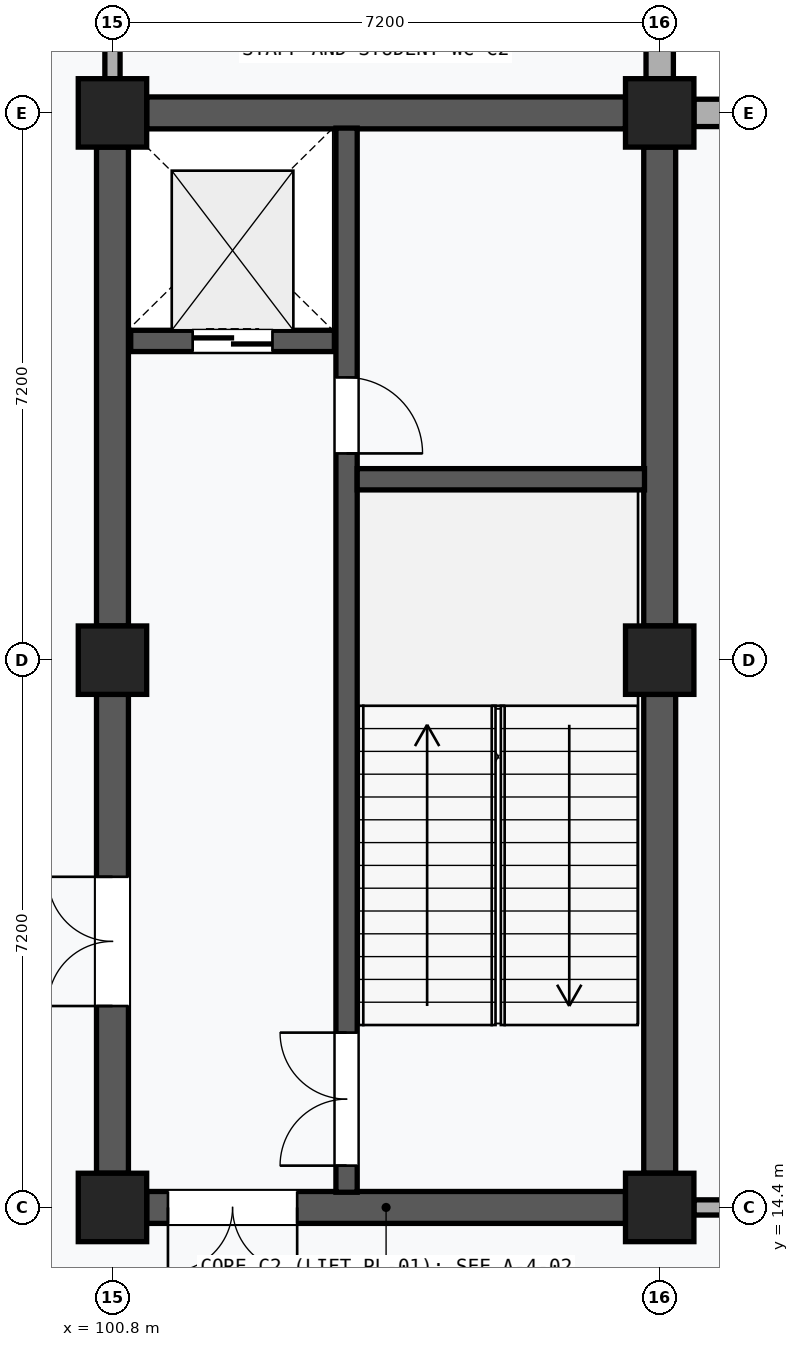
"""IFC4 building model, lengths in metres.
Left out: names, types, materials, properties, quantities, classifications, styles, units other than length and angle.
Written with IfcOpenShell. Run it as: python <this file> out.ifc"""

import sys

from ifc_helpers import new_model, si_unit, direction, frame, frame_2d, origin, origin_2d, place, context, subcontext, project, spatial, rectangle, extrude, element, fill, save


model = new_model("IFC4")
c1 = context("Model", 3, precision=1e-05, world=origin(), true_north=direction((0.0, 1.0)))
c2 = subcontext(c1, "Body", "Model", "MODEL_VIEW")
j1 = project(units=[si_unit("LENGTHUNIT", "METRE"), si_unit("PLANEANGLEUNIT", "RADIAN")], contexts=[c1])
p1 = place(None, origin())
s1 = spatial("IfcSite", under=j1, at=p1, CompositionType="ELEMENT")
p2 = place(p1, origin())
s2 = spatial("IfcBuilding", under=s1, at=p2, CompositionType="ELEMENT")
p3 = place(p2, origin())
s3 = spatial("IfcBuildingStorey", under=s2, at=p3, CompositionType="ELEMENT", Elevation=0.0)
for number, where, z_axis, x_axis in (
    (1, (100.8, 14.4, 0.0), (0.0, 0.0, 1.0), (1.0, 0.0, 0.0)),
    (2, (100.8, 21.6, 0.0), (0.0, 0.0, 1.0), (1.0, 0.0, 0.0)),
    (3, (100.8, 28.8, 0.0), (0.0, 0.0, 1.0), (1.0, 0.0, 0.0)),
    (4, (108.0, 14.4, 0.0), (0.0, 0.0, 1.0), (1.0, 0.0, 0.0)),
    (5, (108.0, 21.6, 0.0), (0.0, 0.0, 1.0), (1.0, 0.0, 0.0)),
    (6, (108.0, 28.8, 0.0), (0.0, 0.0, 1.0), (1.0, 0.0, 0.0)),
):
    element("IfcColumn", number, at=place(p3, frame(where, z_axis=z_axis, x_axis=x_axis)), inside=s3, PredefinedType="COLUMN", context=c2, shape_type="SweptSolid", body=[
        extrude(rectangle(XDim=0.9, YDim=0.9, at=origin_2d()), origin(), (0.0, 0.0, 1.0), 4.8),
    ])
p4 = place(p3, frame((108.0, 29.25, 0.0), z_axis=(0.0, 0.0, 1.0), x_axis=(0.0, 1.0, 0.0)))
e7 = element("IfcWall", 7, at=p4, inside=s3, PredefinedType="SOLIDWALL", context=c2, shape_type="SweptSolid", body=[
    extrude(rectangle(XDim=6.375, YDim=0.36, at=frame_2d((3.188, 0.0))), origin(), (0.0, 0.0, 1.0), 3.89),
])
p5 = place(p4, frame((1.988, 0.0, 0.7)))
e8 = element("IfcOpeningElement", 8, at=p5, cuts=e7, PredefinedType="OPENING", context=c2, shape_type="SweptSolid", body=[
    extrude(rectangle(XDim=2.4, YDim=2.2, at=frame_2d((1.2, 1.1))), frame((0.0, 0.192, 0.0), z_axis=(0.0, -1.0, 0.0), x_axis=(1.0, 0.0, 0.0)), (0.0, 0.0, 1.0), 0.384),
])
p6 = place(p3, frame((108.45, 28.8, 0.0), z_axis=(0.0, 0.0, 1.0), x_axis=(1.0, 0.0, 0.0)))
e9 = element("IfcWall", 9, at=p6, inside=s3, PredefinedType="SOLIDWALL", context=c2, shape_type="SweptSolid", body=[
    extrude(rectangle(XDim=6.5, YDim=0.36, at=frame_2d((3.25, 0.0))), origin(), (0.0, 0.0, 1.0), 3.89),
])
p7 = place(p6, frame((2.05, 0.0, 0.7)))
e10 = element("IfcOpeningElement", 10, at=p7, cuts=e9, PredefinedType="OPENING", context=c2, shape_type="SweptSolid", body=[
    extrude(rectangle(XDim=2.4, YDim=2.2, at=frame_2d((1.2, 1.1))), frame((0.0, 0.192, 0.0), z_axis=(0.0, -1.0, 0.0), x_axis=(1.0, 0.0, 0.0)), (0.0, 0.0, 1.0), 0.384),
])
p8 = place(p3, frame((100.8, 14.85, 0.0), z_axis=(0.0, 0.0, 1.0), x_axis=(0.0, 1.0, 0.0)))
e11 = element("IfcWall", 11, at=p8, inside=s3, PredefinedType="SHEAR", context=c2, shape_type="SweptSolid", body=[
    extrude(rectangle(XDim=6.3, YDim=0.42, at=frame_2d((3.15, 0.0))), origin(), (0.0, 0.0, 1.0), 3.62),
])
p9 = place(p8, frame((2.2, 0.0, 0.0)))
e12 = element("IfcOpeningElement", 12, at=p9, cuts=e11, PredefinedType="OPENING", context=c2, shape_type="SweptSolid", body=[
    extrude(rectangle(XDim=1.7, YDim=2.25, at=frame_2d((0.85, 1.125))), frame((0.0, 0.222, 0.0), z_axis=(0.0, -1.0, 0.0), x_axis=(1.0, 0.0, 0.0)), (0.0, 0.0, 1.0), 0.444),
])
p10 = place(p3, frame((100.8, 22.05, 0.0), z_axis=(0.0, 0.0, 1.0), x_axis=(0.0, 1.0, 0.0)))
e13 = element("IfcWall", 13, at=p10, inside=s3, PredefinedType="SHEAR", context=c2, shape_type="SweptSolid", body=[
    extrude(rectangle(XDim=6.3, YDim=0.42, at=frame_2d((3.15, 0.0))), origin(), (0.0, 0.0, 1.0), 3.62),
])
p11 = place(p3, frame((108.0, 14.85, 0.0), z_axis=(0.0, 0.0, 1.0), x_axis=(0.0, 1.0, 0.0)))
e14 = element("IfcWall", 14, at=p11, inside=s3, PredefinedType="SHEAR", context=c2, shape_type="SweptSolid", body=[
    extrude(rectangle(XDim=6.3, YDim=0.42, at=frame_2d((3.15, 0.0))), origin(), (0.0, 0.0, 1.0), 3.62),
])
p12 = place(p3, frame((108.0, 22.05, 0.0), z_axis=(0.0, 0.0, 1.0), x_axis=(0.0, 1.0, 0.0)))
e15 = element("IfcWall", 15, at=p12, inside=s3, PredefinedType="SHEAR", context=c2, shape_type="SweptSolid", body=[
    extrude(rectangle(XDim=6.3, YDim=0.42, at=frame_2d((3.15, 0.0))), origin(), (0.0, 0.0, 1.0), 3.62),
])
p13 = place(p3, frame((101.25, 14.4, 0.0), z_axis=(0.0, 0.0, 1.0), x_axis=(1.0, 0.0, 0.0)))
e16 = element("IfcWall", 16, at=p13, inside=s3, PredefinedType="SHEAR", context=c2, shape_type="SweptSolid", body=[
    extrude(rectangle(XDim=6.3, YDim=0.42, at=frame_2d((3.15, 0.0))), origin(), (0.0, 0.0, 1.0), 3.62),
])
p14 = place(p13, frame((0.28, 0.0, 0.0)))
e17 = element("IfcOpeningElement", 17, at=p14, cuts=e16, PredefinedType="OPENING", context=c2, shape_type="SweptSolid", body=[
    extrude(rectangle(XDim=1.7, YDim=2.25, at=frame_2d((0.85, 1.125))), frame((0.0, 0.222, 0.0), z_axis=(0.0, -1.0, 0.0), x_axis=(1.0, 0.0, 0.0)), (0.0, 0.0, 1.0), 0.444),
])
p15 = place(p3, frame((101.25, 28.8, 0.0), z_axis=(0.0, 0.0, 1.0), x_axis=(1.0, 0.0, 0.0)))
e18 = element("IfcWall", 18, at=p15, inside=s3, PredefinedType="SHEAR", context=c2, shape_type="SweptSolid", body=[
    extrude(rectangle(XDim=6.3, YDim=0.42, at=frame_2d((3.15, 0.0))), origin(), (0.0, 0.0, 1.0), 3.62),
])
p16 = place(p3, frame((103.88, 14.6, 0.0), z_axis=(0.0, 0.0, 1.0), x_axis=(0.0, 1.0, 0.0)))
e19 = element("IfcWall", 19, at=p16, inside=s3, PredefinedType="SHEAR", context=c2, shape_type="SweptSolid", body=[
    extrude(rectangle(XDim=14.0, YDim=0.28, at=frame_2d((7.0, 0.0))), origin(), (0.0, 0.0, 1.0), 4.52),
])
p17 = place(p16, frame((0.35, 0.0, 0.0)))
e20 = element("IfcOpeningElement", 20, at=p17, cuts=e19, PredefinedType="OPENING", context=c2, shape_type="SweptSolid", body=[
    extrude(rectangle(XDim=1.75, YDim=2.15, at=frame_2d((0.875, 1.075))), frame((0.0, 0.152, 0.0), z_axis=(0.0, -1.0, 0.0), x_axis=(1.0, 0.0, 0.0)), (0.0, 0.0, 1.0), 0.304),
])
p18 = place(p16, frame((9.72, 0.0, 0.0)))
e21 = element("IfcOpeningElement", 21, at=p18, cuts=e19, PredefinedType="OPENING", context=c2, shape_type="SweptSolid", body=[
    extrude(rectangle(XDim=1.0, YDim=2.15, at=frame_2d((0.5, 1.075))), frame((0.0, 0.152, 0.0), z_axis=(0.0, -1.0, 0.0), x_axis=(1.0, 0.0, 0.0)), (0.0, 0.0, 1.0), 0.304),
])
p19 = place(p3, frame((104.02, 23.98, 0.0), z_axis=(0.0, 0.0, 1.0), x_axis=(1.0, 0.0, 0.0)))
e22 = element("IfcWall", 22, at=p19, inside=s3, PredefinedType="SHEAR", context=c2, shape_type="SweptSolid", body=[
    extrude(rectangle(XDim=3.78, YDim=0.28, at=frame_2d((1.89, 0.0))), origin(), (0.0, 0.0, 1.0), 4.52),
])
p20 = place(p3, frame((101.04, 25.8, 0.0), z_axis=(0.0, 0.0, 1.0), x_axis=(1.0, 0.0, 0.0)))
e23 = element("IfcWall", 23, at=p20, inside=s3, PredefinedType="SHEAR", context=c2, shape_type="SweptSolid", body=[
    extrude(rectangle(XDim=2.68, YDim=0.28, at=frame_2d((1.34, 0.0))), origin(), (0.0, 0.0, 1.0), 4.52),
])
p21 = place(p20, frame((0.815, 0.0, 0.0)))
e24 = element("IfcOpeningElement", 24, at=p21, cuts=e23, PredefinedType="OPENING", context=c2, shape_type="SweptSolid", body=[
    extrude(rectangle(XDim=1.05, YDim=2.2, at=frame_2d((0.525, 1.1))), frame((0.0, 0.152, 0.0), z_axis=(0.0, -1.0, 0.0), x_axis=(1.0, 0.0, 0.0)), (0.0, 0.0, 1.0), 0.304),
])
p22 = place(p3, frame((108.45, 14.4, 0.0), z_axis=(0.0, 0.0, 1.0), x_axis=(1.0, 0.0, 0.0)))
e25 = element("IfcWall", 25, at=p22, inside=s3, PredefinedType="PARTITIONING", context=c2, shape_type="SweptSolid", body=[
    extrude(rectangle(XDim=6.35, YDim=0.2, at=frame_2d((3.175, 0.0))), origin(), (0.0, 0.0, 1.0), 3.62),
])
p23 = place(p22, frame((2.665, 0.0, 0.0)))
e26 = element("IfcOpeningElement", 26, at=p23, cuts=e25, PredefinedType="OPENING", context=c2, shape_type="SweptSolid", body=[
    extrude(rectangle(XDim=1.02, YDim=2.12, at=frame_2d((0.51, 1.06))), frame((0.0, 0.112, 0.0), z_axis=(0.0, -1.0, 0.0), x_axis=(1.0, 0.0, 0.0)), (0.0, 0.0, 1.0), 0.224),
])
p24 = place(p3, frame((100.8, 29.25, 0.0), z_axis=(0.0, 0.0, 1.0), x_axis=(0.0, 1.0, 0.0)))
e27 = element("IfcWall", 27, at=p24, inside=s3, PredefinedType="PARTITIONING", context=c2, shape_type="SweptSolid", body=[
    extrude(rectangle(XDim=6.3, YDim=0.2, at=frame_2d((3.15, 0.0))), origin(), (0.0, 0.0, 1.0), 3.62),
])
p25 = place(p24, frame((2.53, 0.0, 0.0)))
e28 = element("IfcOpeningElement", 28, at=p25, cuts=e27, PredefinedType="OPENING", context=c2, shape_type="SweptSolid", body=[
    extrude(rectangle(XDim=1.24, YDim=2.26, at=frame_2d((0.62, 1.13))), frame((0.0, 0.112, 0.0), z_axis=(0.0, -1.0, 0.0), x_axis=(1.0, 0.0, 0.0)), (0.0, 0.0, 1.0), 0.224),
])
p26 = place(p9, origin())
e29 = element("IfcDoor", 29, at=p26, inside=s3, OperationType="DOUBLE_DOOR_SINGLE_SWING", PredefinedType="DOOR", context=c2, shape_type="SweptSolid", body=[
    extrude(rectangle(XDim=1.7, YDim=2.25, at=frame_2d((0.85, 1.125))), frame((0.0, 0.025, 0.0), z_axis=(0.0, -1.0, 0.0), x_axis=(1.0, 0.0, 0.0)), (0.0, 0.0, 1.0), 0.05),
])
fill(e12, e29)
p27 = place(p14, frame((1.7, 0.0, 0.0), z_axis=(0.0, 0.0, 1.0), x_axis=(-1.0, 0.0, 0.0)))
e30 = element("IfcDoor", 30, at=p27, inside=s3, OperationType="DOUBLE_DOOR_SINGLE_SWING", PredefinedType="DOOR", context=c2, shape_type="SweptSolid", body=[
    extrude(rectangle(XDim=1.7, YDim=2.25, at=frame_2d((0.85, 1.125))), frame((0.0, 0.025, 0.0), z_axis=(0.0, -1.0, 0.0), x_axis=(1.0, 0.0, 0.0)), (0.0, 0.0, 1.0), 0.05),
])
fill(e17, e30)
p28 = place(p17, origin())
e31 = element("IfcDoor", 31, at=p28, inside=s3, OperationType="DOUBLE_DOOR_SINGLE_SWING", PredefinedType="DOOR", context=c2, shape_type="SweptSolid", body=[
    extrude(rectangle(XDim=1.75, YDim=2.15, at=frame_2d((0.875, 1.075))), frame((0.0, 0.025, 0.0), z_axis=(0.0, -1.0, 0.0), x_axis=(1.0, 0.0, 0.0)), (0.0, 0.0, 1.0), 0.05),
])
fill(e20, e31)
p29 = place(p18, frame((1.0, 0.0, 0.0), z_axis=(0.0, 0.0, 1.0), x_axis=(-1.0, 0.0, 0.0)))
e32 = element("IfcDoor", 32, at=p29, inside=s3, OperationType="SINGLE_SWING_RIGHT", PredefinedType="DOOR", context=c2, shape_type="SweptSolid", body=[
    extrude(rectangle(XDim=1.0, YDim=2.15, at=frame_2d((0.5, 1.075))), frame((0.0, 0.025, 0.0), z_axis=(0.0, -1.0, 0.0), x_axis=(1.0, 0.0, 0.0)), (0.0, 0.0, 1.0), 0.05),
])
fill(e21, e32)
p30 = place(p21, frame((1.05, 0.0, 0.0), z_axis=(0.0, 0.0, 1.0), x_axis=(-1.0, 0.0, 0.0)))
e33 = element("IfcDoor", 33, at=p30, inside=s3, OperationType="DOUBLE_DOOR_SLIDING", PredefinedType="DOOR", context=c2, shape_type="SweptSolid", body=[
    extrude(rectangle(XDim=1.05, YDim=2.2, at=frame_2d((0.525, 1.1))), frame((0.0, 0.025, 0.0), z_axis=(0.0, -1.0, 0.0), x_axis=(1.0, 0.0, 0.0)), (0.0, 0.0, 1.0), 0.05),
])
fill(e24, e33)
save(model, sys.argv[1])
